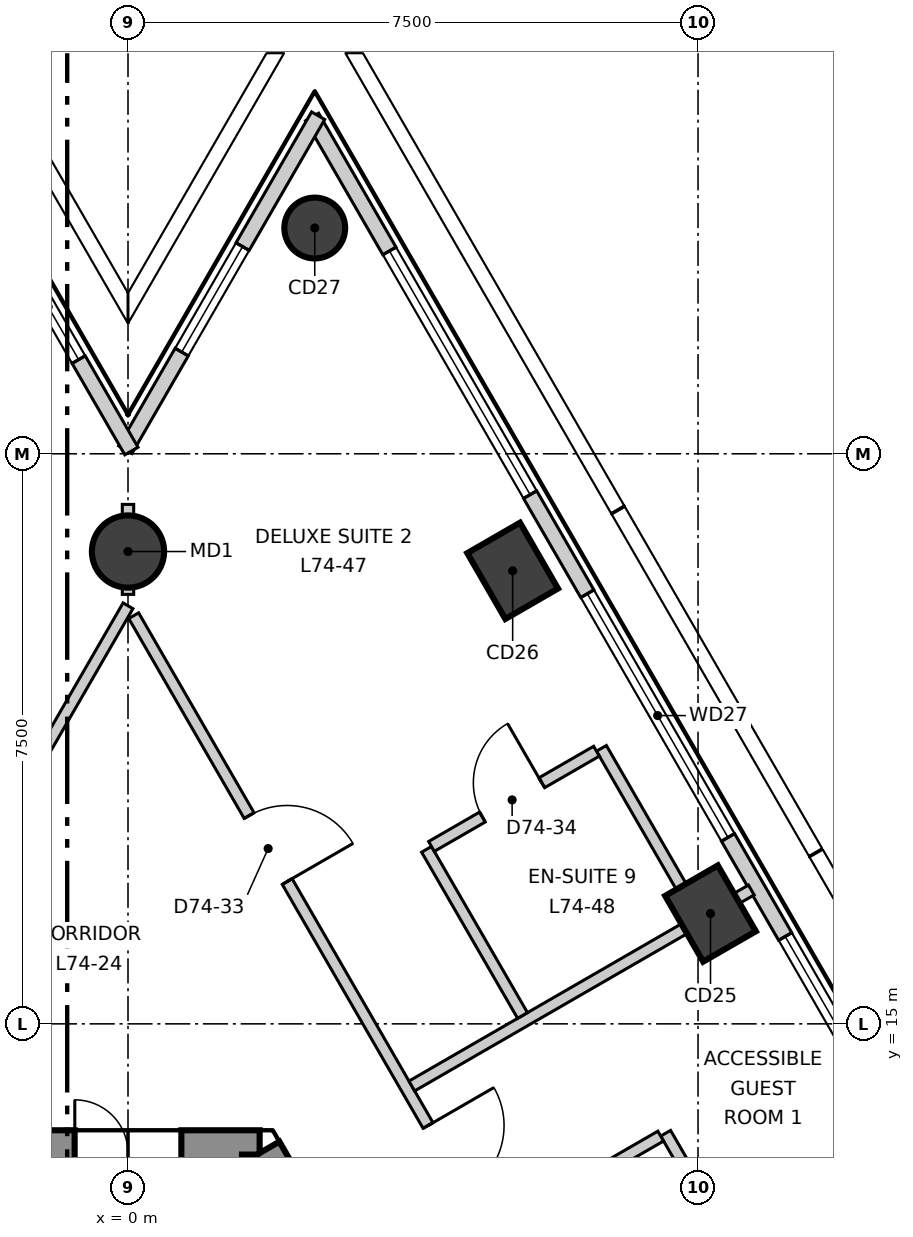
"""IFC4 building model, lengths in metres.
Left out: names, types, materials, properties, quantities, classifications, styles, units other than length and angle.
Written with IfcOpenShell. Run it as: python <this file> out.ifc"""

import sys

from ifc_helpers import new_model, si_unit, direction, frame, frame_2d, origin, origin_2d, place, context, subcontext, project, spatial, polyline, rectangle, circle, outline, extrude, element, fill, save


model = new_model("IFC4")
c1 = context("Model", 3, precision=1e-05, world=origin(), true_north=direction((0.0, 1.0)))
c2 = subcontext(c1, "Body", "Model", "MODEL_VIEW")
j1 = project(units=[si_unit("LENGTHUNIT", "METRE"), si_unit("PLANEANGLEUNIT", "RADIAN")], contexts=[c1])
p1 = place(None, origin())
s1 = spatial("IfcSite", under=j1, at=p1, CompositionType="ELEMENT")
p2 = place(p1, origin())
s2 = spatial("IfcBuilding", under=s1, at=p2, CompositionType="ELEMENT")
p3 = place(p2, frame((0.0, 0.0, 311.5)))
s3 = spatial("IfcBuildingStorey", under=s2, at=p3, CompositionType="ELEMENT", Elevation=311.5)
p4 = place(p3, frame((1.732, 13.3, -0.3), z_axis=(0.0, 0.0, 1.0), x_axis=(-1.0, 0.0, 0.0)))
e1 = element("IfcWall", 1, at=p4, inside=s3, PredefinedType="SHEAR", context=c2, shape_type="SweptSolid", body=[
    extrude(outline(polyline([(-0.173, -0.3), (1.732, -0.3), (3.637, -0.3), (3.291, 0.3), (1.732, 0.3), (0.173, 0.3), (-0.173, -0.3)])), origin(), (0.0, 0.0, 1.0), 3.6),
])
p5 = place(p4, frame((1.032, 0.0, 0.3)))
e2 = element("IfcOpeningElement", 2, at=p5, cuts=e1, PredefinedType="OPENING", context=c2, shape_type="SweptSolid", body=[
    extrude(rectangle(XDim=1.4, YDim=2.1, at=frame_2d((0.7, 1.05))), frame((0.0, 0.31, 0.0), z_axis=(0.0, -1.0, 0.0), x_axis=(1.0, 0.0, 0.0)), (0.0, 0.0, 1.0), 0.62),
])
p6 = place(p3, frame((12.384, -5.15, -0.3), z_axis=(0.0, 0.0, 1.0), x_axis=(-0.500000539815, 0.866025092122, 0.0)))
e3 = element("IfcWall", 3, at=p6, inside=s3, PredefinedType="SHEAR", context=c2, shape_type="SweptSolid", body=[
    extrude(outline(polyline([(-0.173, -0.301), (1.795, -0.301), (3.763, -0.301), (5.731, -0.301), (7.7, -0.301), (9.668, -0.301), (11.636, -0.301), (13.604, -0.3), (15.573, -0.3), (17.541, -0.3), (19.509, -0.3), (21.477, -0.3), (21.131, 0.3), (19.226, 0.3), (17.321, 0.3), (15.415, 0.3), (13.51, 0.3), (11.605, 0.3), (9.699, 0.3), (7.794, 0.3), (5.889, 0.3), (3.984, 0.3), (2.078, 0.3), (0.173, 0.3), (-0.173, -0.301)])), origin(), (0.0, 0.0, 1.0), 3.6),
])
p7 = place(p6, frame((16.378, 0.0, 0.3)))
e4 = element("IfcOpeningElement", 4, at=p7, cuts=e3, PredefinedType="OPENING", context=c2, shape_type="SweptSolid", body=[
    extrude(rectangle(XDim=0.9, YDim=2.1, at=frame_2d((0.45, 1.05))), frame((0.0, 0.31, 0.0), z_axis=(0.0, -1.0, 0.0), x_axis=(1.0, 0.0, 0.0)), (0.0, 0.0, 1.0), 0.621),
])
p8 = place(p6, frame((4.026, 0.0, 0.3)))
e5 = element("IfcOpeningElement", 5, at=p8, cuts=e3, PredefinedType="OPENING", context=c2, shape_type="SweptSolid", body=[
    extrude(rectangle(XDim=0.9, YDim=2.1, at=frame_2d((0.45, 1.05))), frame((0.0, 0.31, 0.0), z_axis=(0.0, -1.0, 0.0), x_axis=(1.0, 0.0, 0.0)), (0.0, 0.0, 1.0), 0.621),
])
for number, where, z_axis, x_axis in (
    (6, (7.664, 16.451, -0.3), (0.0, 0.0, 1.0), (-0.5, 0.866, 0.0)),
    (7, (5.061, 20.96, -0.3), (0.0, 0.0, 1.0), (-0.5, 0.866, 0.0)),
):
    element("IfcColumn", number, at=place(p3, frame(where, z_axis=z_axis, x_axis=x_axis)), inside=s3, PredefinedType="COLUMN", context=c2, shape_type="SweptSolid", body=[
        extrude(rectangle(XDim=1.0, YDim=0.8, at=origin_2d()), origin(), (0.0, 0.0, 1.0), 3.6),
    ])
p9 = place(p3, frame((2.457, 25.47, -0.3), z_axis=(0.0, 0.0, 1.0), x_axis=(-0.5, 0.866025403784, 0.0)))
e8 = element("IfcColumn", 8, at=p9, inside=s3, PredefinedType="COLUMN", context=c2, shape_type="SweptSolid", body=[
    extrude(circle(Radius=0.4, at=origin_2d()), origin(), (0.0, 0.0, 1.0), 3.6),
])
p10 = place(p3, frame((0.0, 21.214, -0.3), z_axis=(0.0, 0.0, 1.0), x_axis=(1.0, 0.0, 0.0)))
e9 = element("IfcColumn", 9, at=p10, inside=s3, PredefinedType="COLUMN", context=c2, shape_type="SweptSolid", body=[
    extrude(circle(Radius=0.475, at=origin_2d()), origin(), (0.0, 0.0, 1.0), 3.6),
])
p11 = place(p3, frame((24.544, -11.385, 0.0), z_axis=(0.0, 0.0, 1.0), x_axis=(-0.500002044679, 0.866024223285, 0.0)))
e10 = element("IfcWall", 10, at=p11, inside=s3, PredefinedType="ELEMENTEDWALL", context=c2, shape_type="SweptSolid", body=[
    extrude(rectangle(XDim=44.243, YDim=0.2, at=frame_2d((22.122, 0.0))), origin(), (0.0, 0.0, 1.0), 3.3),
])
p12 = place(p11, frame((2.056, 0.0, 0.9)))
e11 = element("IfcOpeningElement", 11, at=p12, cuts=e10, PredefinedType="OPENING", context=c2, shape_type="SweptSolid", body=[
    extrude(rectangle(XDim=3.7, YDim=2.2, at=frame_2d((1.85, 1.1))), frame((0.0, 0.11, 0.0), z_axis=(0.0, -1.0, 0.0), x_axis=(1.0, 0.0, 0.0)), (0.0, 0.0, 1.0), 0.22),
])
p13 = place(p11, frame((7.264, 0.0, 0.9)))
e12 = element("IfcOpeningElement", 12, at=p13, cuts=e10, PredefinedType="OPENING", context=c2, shape_type="SweptSolid", body=[
    extrude(rectangle(XDim=3.7, YDim=2.2, at=frame_2d((1.85, 1.1))), frame((0.0, 0.11, 0.0), z_axis=(0.0, -1.0, 0.0), x_axis=(1.0, 0.0, 0.0)), (0.0, 0.0, 1.0), 0.22),
])
p14 = place(p11, frame((12.471, 0.0, 0.9)))
e13 = element("IfcOpeningElement", 13, at=p14, cuts=e10, PredefinedType="OPENING", context=c2, shape_type="SweptSolid", body=[
    extrude(rectangle(XDim=3.7, YDim=2.2, at=frame_2d((1.85, 1.1))), frame((0.0, 0.11, 0.0), z_axis=(0.0, -1.0, 0.0), x_axis=(1.0, 0.0, 0.0)), (0.0, 0.0, 1.0), 0.22),
])
p15 = place(p11, frame((17.678, 0.0, 0.9)))
e14 = element("IfcOpeningElement", 14, at=p15, cuts=e10, PredefinedType="OPENING", context=c2, shape_type="SweptSolid", body=[
    extrude(rectangle(XDim=3.7, YDim=2.2, at=frame_2d((1.85, 1.1))), frame((0.0, 0.11, 0.0), z_axis=(0.0, -1.0, 0.0), x_axis=(1.0, 0.0, 0.0)), (0.0, 0.0, 1.0), 0.22),
])
p16 = place(p11, frame((22.885, 0.0, 0.9)))
e15 = element("IfcOpeningElement", 15, at=p16, cuts=e10, PredefinedType="OPENING", context=c2, shape_type="SweptSolid", body=[
    extrude(rectangle(XDim=3.7, YDim=2.2, at=frame_2d((1.85, 1.1))), frame((0.0, 0.11, 0.0), z_axis=(0.0, -1.0, 0.0), x_axis=(1.0, 0.0, 0.0)), (0.0, 0.0, 1.0), 0.22),
])
p17 = place(p11, frame((28.093, 0.0, 0.9)))
e16 = element("IfcOpeningElement", 16, at=p17, cuts=e10, PredefinedType="OPENING", context=c2, shape_type="SweptSolid", body=[
    extrude(rectangle(XDim=3.7, YDim=2.2, at=frame_2d((1.85, 1.1))), frame((0.0, 0.11, 0.0), z_axis=(0.0, -1.0, 0.0), x_axis=(1.0, 0.0, 0.0)), (0.0, 0.0, 1.0), 0.22),
])
p18 = place(p11, frame((33.3, 0.0, 0.9)))
e17 = element("IfcOpeningElement", 17, at=p18, cuts=e10, PredefinedType="OPENING", context=c2, shape_type="SweptSolid", body=[
    extrude(rectangle(XDim=3.7, YDim=2.2, at=frame_2d((1.85, 1.1))), frame((0.0, 0.11, 0.0), z_axis=(0.0, -1.0, 0.0), x_axis=(1.0, 0.0, 0.0)), (0.0, 0.0, 1.0), 0.22),
])
p19 = place(p11, frame((38.507, 0.0, 0.9)))
e18 = element("IfcOpeningElement", 18, at=p19, cuts=e10, PredefinedType="OPENING", context=c2, shape_type="SweptSolid", body=[
    extrude(rectangle(XDim=3.7, YDim=2.2, at=frame_2d((1.85, 1.1))), frame((0.0, 0.11, 0.0), z_axis=(0.0, -1.0, 0.0), x_axis=(1.0, 0.0, 0.0)), (0.0, 0.0, 1.0), 0.22),
])
p20 = place(p3, frame((2.502, 26.948, 0.0), z_axis=(0.0, 0.0, 1.0), x_axis=(-0.499911250765, -0.866076637116, 0.0)))
e19 = element("IfcWall", 19, at=p20, inside=s3, PredefinedType="ELEMENTEDWALL", context=c2, shape_type="SweptSolid", body=[
    extrude(rectangle(XDim=5.075, YDim=0.2, at=frame_2d((2.537, 0.0))), origin(), (0.0, 0.0, 1.0), 3.3),
])
p21 = place(p20, frame((1.99, 0.0, 0.9)))
e20 = element("IfcOpeningElement", 20, at=p21, cuts=e19, PredefinedType="OPENING", context=c2, shape_type="SweptSolid", body=[
    extrude(rectangle(XDim=1.6, YDim=2.2, at=frame_2d((0.8, 1.1))), frame((0.0, 0.11, 0.0), z_axis=(0.0, -1.0, 0.0), x_axis=(1.0, 0.0, 0.0)), (0.0, 0.0, 1.0), 0.22),
])
p22 = place(p3, frame((0.045, 22.536, 0.0), z_axis=(0.0, 0.0, 1.0), x_axis=(-0.499911250765, 0.866076637116, 0.0)))
e21 = element("IfcWall", 21, at=p22, inside=s3, PredefinedType="ELEMENTEDWALL", context=c2, shape_type="SweptSolid", body=[
    extrude(rectangle(XDim=5.075, YDim=0.2, at=frame_2d((2.537, 0.0))), origin(), (0.0, 0.0, 1.0), 3.3),
])
p23 = place(p22, frame((1.39, 0.0, 0.9)))
e22 = element("IfcOpeningElement", 22, at=p23, cuts=e21, PredefinedType="OPENING", context=c2, shape_type="SweptSolid", body=[
    extrude(rectangle(XDim=1.6, YDim=2.2, at=frame_2d((0.8, 1.1))), frame((0.0, 0.11, 0.0), z_axis=(0.0, -1.0, 0.0), x_axis=(1.0, 0.0, 0.0)), (0.0, 0.0, 1.0), 0.22),
])
p24 = place(p3, frame((-17.678, -10.12, 0.0), z_axis=(0.0, 0.0, 1.0), x_axis=(0.49998824015, 0.86603219323, 0.0)))
e23 = element("IfcWall", 23, at=p24, inside=s3, PredefinedType="PARTITIONING", context=c2, shape_type="SweptSolid", body=[
    extrude(rectangle(XDim=35.357, YDim=0.15, at=frame_2d((17.678, 0.0))), origin(), (0.0, 0.0, 1.0), 3.3),
])
p25 = place(p24, frame((28.607, 0.0, 0.0)))
e24 = element("IfcOpeningElement", 24, at=p25, cuts=e23, PredefinedType="OPENING", context=c2, shape_type="SweptSolid", body=[
    extrude(rectangle(XDim=1.0, YDim=2.1, at=frame_2d((0.5, 1.05))), frame((0.0, 0.085, 0.0), z_axis=(0.0, -1.0, 0.0), x_axis=(1.0, 0.0, 0.0)), (0.0, 0.0, 1.0), 0.17),
])
p26 = place(p24, frame((13.86, 0.0, 0.0)))
e25 = element("IfcOpeningElement", 25, at=p26, cuts=e23, PredefinedType="OPENING", context=c2, shape_type="SweptSolid", body=[
    extrude(rectangle(XDim=1.0, YDim=2.1, at=frame_2d((0.5, 1.05))), frame((0.0, 0.085, 0.0), z_axis=(0.0, -1.0, 0.0), x_axis=(1.0, 0.0, 0.0)), (0.0, 0.0, 1.0), 0.17),
])
p27 = place(p24, frame((18.96, 0.0, 0.0)))
e26 = element("IfcOpeningElement", 26, at=p27, cuts=e23, PredefinedType="OPENING", context=c2, shape_type="SweptSolid", body=[
    extrude(rectangle(XDim=0.9, YDim=2.1, at=frame_2d((0.45, 1.05))), frame((0.0, 0.085, 0.0), z_axis=(0.0, -1.0, 0.0), x_axis=(1.0, 0.0, 0.0)), (0.0, 0.0, 1.0), 0.17),
])
p28 = place(p24, frame((16.86, 0.0, 0.0)))
e27 = element("IfcOpeningElement", 27, at=p28, cuts=e23, PredefinedType="OPENING", context=c2, shape_type="SweptSolid", body=[
    extrude(rectangle(XDim=0.9, YDim=2.1, at=frame_2d((0.45, 1.05))), frame((0.0, 0.085, 0.0), z_axis=(0.0, -1.0, 0.0), x_axis=(1.0, 0.0, 0.0)), (0.0, 0.0, 1.0), 0.17),
])
p29 = place(p24, frame((8.146, 0.0, 0.0)))
e28 = element("IfcOpeningElement", 28, at=p29, cuts=e23, PredefinedType="OPENING", context=c2, shape_type="SweptSolid", body=[
    extrude(rectangle(XDim=1.0, YDim=2.1, at=frame_2d((0.5, 1.05))), frame((0.0, 0.085, 0.0), z_axis=(0.0, -1.0, 0.0), x_axis=(1.0, 0.0, 0.0)), (0.0, 0.0, 1.0), 0.17),
])
p30 = place(p24, frame((3.038, 0.0, 0.0)))
e29 = element("IfcOpeningElement", 29, at=p30, cuts=e23, PredefinedType="OPENING", context=c2, shape_type="SweptSolid", body=[
    extrude(rectangle(XDim=1.0, YDim=2.1, at=frame_2d((0.5, 1.05))), frame((0.0, 0.085, 0.0), z_axis=(0.0, -1.0, 0.0), x_axis=(1.0, 0.0, 0.0)), (0.0, 0.0, 1.0), 0.17),
])
p31 = place(p3, frame((0.0, 20.65, 0.0), z_axis=(0.0, 0.0, 1.0), x_axis=(0.0, 1.0, 0.0)))
e30 = element("IfcWall", 30, at=p31, inside=s3, PredefinedType="PARTITIONING", context=c2, shape_type="SweptSolid", body=[
    extrude(rectangle(XDim=1.184, YDim=0.15, at=frame_2d((0.592, 0.0))), origin(), (0.0, 0.0, 1.0), 2.8),
])
p32 = place(p3, frame((0.075, 20.37, 0.0), z_axis=(0.0, 0.0, 1.0), x_axis=(0.500006672087, -0.866021551619, 0.0)))
e31 = element("IfcWall", 31, at=p32, inside=s3, PredefinedType="PARTITIONING", context=c2, shape_type="SweptSolid", body=[
    extrude(rectangle(XDim=35.27, YDim=0.15, at=frame_2d((17.635, 0.0))), origin(), (0.0, 0.0, 1.0), 3.3),
])
p33 = place(p32, frame((31.206, 0.0, 0.0)))
e32 = element("IfcOpeningElement", 32, at=p33, cuts=e31, PredefinedType="OPENING", context=c2, shape_type="SweptSolid", body=[
    extrude(rectangle(XDim=1.0, YDim=2.1, at=frame_2d((0.5, 1.05))), frame((0.0, 0.085, 0.0), z_axis=(0.0, -1.0, 0.0), x_axis=(1.0, 0.0, 0.0)), (0.0, 0.0, 1.0), 0.17),
])
p34 = place(p32, frame((19.968, 0.0, 0.0)))
e33 = element("IfcOpeningElement", 33, at=p34, cuts=e31, PredefinedType="OPENING", context=c2, shape_type="SweptSolid", body=[
    extrude(rectangle(XDim=1.0, YDim=2.1, at=frame_2d((0.5, 1.05))), frame((0.0, 0.085, 0.0), z_axis=(0.0, -1.0, 0.0), x_axis=(1.0, 0.0, 0.0)), (0.0, 0.0, 1.0), 0.17),
])
p35 = place(p32, frame((13.353, 0.0, 0.0)))
e34 = element("IfcOpeningElement", 34, at=p35, cuts=e31, PredefinedType="OPENING", context=c2, shape_type="SweptSolid", body=[
    extrude(rectangle(XDim=1.0, YDim=2.1, at=frame_2d((0.5, 1.05))), frame((0.0, 0.085, 0.0), z_axis=(0.0, -1.0, 0.0), x_axis=(1.0, 0.0, 0.0)), (0.0, 0.0, 1.0), 0.17),
])
p36 = place(p32, frame((7.746, 0.0, 0.0)))
e35 = element("IfcOpeningElement", 35, at=p36, cuts=e31, PredefinedType="OPENING", context=c2, shape_type="SweptSolid", body=[
    extrude(rectangle(XDim=1.0, YDim=2.1, at=frame_2d((0.5, 1.05))), frame((0.0, 0.085, 0.0), z_axis=(0.0, -1.0, 0.0), x_axis=(1.0, 0.0, 0.0)), (0.0, 0.0, 1.0), 0.17),
])
p37 = place(p32, frame((3.038, 0.0, 0.0)))
e36 = element("IfcOpeningElement", 36, at=p37, cuts=e31, PredefinedType="OPENING", context=c2, shape_type="SweptSolid", body=[
    extrude(rectangle(XDim=1.0, YDim=2.1, at=frame_2d((0.5, 1.05))), frame((0.0, 0.085, 0.0), z_axis=(0.0, -1.0, 0.0), x_axis=(1.0, 0.0, 0.0)), (0.0, 0.0, 1.0), 0.17),
])
p38 = place(p3, frame((3.734, 14.182, 0.0), z_axis=(0.0, 0.0, 1.0), x_axis=(0.866020851292, 0.500007885066, 0.0)))
e37 = element("IfcWall", 37, at=p38, inside=s3, PredefinedType="PARTITIONING", context=c2, shape_type="SweptSolid", body=[
    extrude(rectangle(XDim=5.158, YDim=0.15, at=frame_2d((2.579, 0.0))), origin(), (0.0, 0.0, 1.0), 3.3),
])
p39 = place(p3, frame((7.074, 13.561, 0.0), z_axis=(0.0, 0.0, 1.0), x_axis=(0.499874209568, -0.866098016745, 0.0)))
e38 = element("IfcWall", 38, at=p39, inside=s3, PredefinedType="PARTITIONING", context=c2, shape_type="SweptSolid", body=[
    extrude(rectangle(XDim=2.925, YDim=0.15, at=frame_2d((1.462, 0.0))), origin(), (0.0, 0.0, 1.0), 3.3),
])
p40 = place(p39, frame((1.05, 0.0, 0.0)))
e39 = element("IfcOpeningElement", 39, at=p40, cuts=e38, PredefinedType="OPENING", context=c2, shape_type="SweptSolid", body=[
    extrude(rectangle(XDim=0.9, YDim=2.1, at=frame_2d((0.45, 1.05))), frame((0.0, 0.085, 0.0), z_axis=(0.0, -1.0, 0.0), x_axis=(1.0, 0.0, 0.0)), (0.0, 0.0, 1.0), 0.17),
])
p41 = place(p3, frame((4.838, 12.27, 0.0), z_axis=(0.0, 0.0, 1.0), x_axis=(0.866125586781, 0.4998264378, 0.0)))
e40 = element("IfcWall", 40, at=p41, inside=s3, PredefinedType="PARTITIONING", context=c2, shape_type="SweptSolid", body=[
    extrude(rectangle(XDim=2.507, YDim=0.15, at=frame_2d((1.253, 0.0))), origin(), (0.0, 0.0, 1.0), 3.3),
])
p42 = place(p3, frame((3.928, 17.296, 0.0), z_axis=(0.0, 0.0, 1.0), x_axis=(0.50028887667, -0.865858556509, 0.0)))
e41 = element("IfcWall", 41, at=p42, inside=s3, PredefinedType="PARTITIONING", context=c2, shape_type="SweptSolid", body=[
    extrude(rectangle(XDim=2.524, YDim=0.15, at=frame_2d((1.262, 0.0))), origin(), (0.0, 0.0, 1.0), 3.3),
])
p43 = place(p3, frame((6.229, 18.625, 0.0), z_axis=(0.0, 0.0, 1.0), x_axis=(0.499789415832, -0.866146950478, 0.0)))
e42 = element("IfcWall", 42, at=p43, inside=s3, PredefinedType="PARTITIONING", context=c2, shape_type="SweptSolid", body=[
    extrude(rectangle(XDim=2.525, YDim=0.15, at=frame_2d((1.262, 0.0))), origin(), (0.0, 0.0, 1.0), 2.6),
])
p44 = place(p3, frame((3.993, 17.334, 0.0), z_axis=(0.0, 0.0, 1.0), x_axis=(0.866125586781, 0.4998264378, 0.0)))
e43 = element("IfcWall", 43, at=p44, inside=s3, PredefinedType="PARTITIONING", context=c2, shape_type="SweptSolid", body=[
    extrude(rectangle(XDim=2.507, YDim=0.15, at=frame_2d((1.253, 0.0))), origin(), (0.0, 0.0, 1.0), 3.3),
])
p45 = place(p44, frame((0.775, 0.0, 0.0)))
e44 = element("IfcOpeningElement", 44, at=p45, cuts=e43, PredefinedType="OPENING", context=c2, shape_type="SweptSolid", body=[
    extrude(rectangle(XDim=0.9, YDim=2.1, at=frame_2d((0.45, 1.05))), frame((0.0, 0.085, 0.0), z_axis=(0.0, -1.0, 0.0), x_axis=(1.0, 0.0, 0.0)), (0.0, 0.0, 1.0), 0.17),
])
p46 = place(p3, frame((1.6, 6.615, 0.0), z_axis=(0.0, 0.0, 1.0), x_axis=(0.0, 1.0, 0.0)))
e45 = element("IfcWall", 45, at=p46, inside=s3, PredefinedType="SOLIDWALL", context=c2, shape_type="SweptSolid", body=[
    extrude(rectangle(XDim=6.665, YDim=0.2, at=frame_2d((3.333, 0.0))), origin(), (0.0, 0.0, 1.0), 3.3),
])
p47 = place(p17, origin())
e46 = element("IfcWindow", 46, at=p47, inside=s3, PartitioningType="SINGLE_PANEL", PredefinedType="WINDOW", context=c2, shape_type="SweptSolid", body=[
    extrude(rectangle(XDim=3.7, YDim=2.2, at=frame_2d((1.85, 1.1))), frame((0.0, 0.03, 0.0), z_axis=(0.0, -1.0, 0.0), x_axis=(1.0, 0.0, 0.0)), (0.0, 0.0, 1.0), 0.06),
])
fill(e16, e46)
p48 = place(p18, origin())
e47 = element("IfcWindow", 47, at=p48, inside=s3, PartitioningType="SINGLE_PANEL", PredefinedType="WINDOW", context=c2, shape_type="SweptSolid", body=[
    extrude(rectangle(XDim=3.7, YDim=2.2, at=frame_2d((1.85, 1.1))), frame((0.0, 0.03, 0.0), z_axis=(0.0, -1.0, 0.0), x_axis=(1.0, 0.0, 0.0)), (0.0, 0.0, 1.0), 0.06),
])
fill(e17, e47)
p49 = place(p19, origin())
e48 = element("IfcWindow", 48, at=p49, inside=s3, PartitioningType="SINGLE_PANEL", PredefinedType="WINDOW", context=c2, shape_type="SweptSolid", body=[
    extrude(rectangle(XDim=3.7, YDim=2.2, at=frame_2d((1.85, 1.1))), frame((0.0, 0.03, 0.0), z_axis=(0.0, -1.0, 0.0), x_axis=(1.0, 0.0, 0.0)), (0.0, 0.0, 1.0), 0.06),
])
fill(e18, e48)
p50 = place(p21, origin())
e49 = element("IfcWindow", 49, at=p50, inside=s3, PartitioningType="SINGLE_PANEL", PredefinedType="WINDOW", context=c2, shape_type="SweptSolid", body=[
    extrude(rectangle(XDim=1.6, YDim=2.2, at=frame_2d((0.8, 1.1))), frame((0.0, 0.03, 0.0), z_axis=(0.0, -1.0, 0.0), x_axis=(1.0, 0.0, 0.0)), (0.0, 0.0, 1.0), 0.06),
])
fill(e20, e49)
p51 = place(p23, origin())
e50 = element("IfcWindow", 50, at=p51, inside=s3, PartitioningType="SINGLE_PANEL", PredefinedType="WINDOW", context=c2, shape_type="SweptSolid", body=[
    extrude(rectangle(XDim=1.6, YDim=2.2, at=frame_2d((0.8, 1.1))), frame((0.0, 0.03, 0.0), z_axis=(0.0, -1.0, 0.0), x_axis=(1.0, 0.0, 0.0)), (0.0, 0.0, 1.0), 0.06),
])
fill(e22, e50)
p52 = place(p36, origin())
e51 = element("IfcDoor", 51, at=p52, inside=s3, OperationType="SINGLE_SWING_RIGHT", PredefinedType="DOOR", context=c2, shape_type="SweptSolid", body=[
    extrude(rectangle(XDim=1.0, YDim=2.1, at=frame_2d((0.5, 1.05))), frame((0.0, 0.025, 0.0), z_axis=(0.0, -1.0, 0.0), x_axis=(1.0, 0.0, 0.0)), (0.0, 0.0, 1.0), 0.05),
])
fill(e35, e51)
p53 = place(p37, origin())
e52 = element("IfcDoor", 52, at=p53, inside=s3, OperationType="SINGLE_SWING_LEFT", PredefinedType="DOOR", context=c2, shape_type="SweptSolid", body=[
    extrude(rectangle(XDim=1.0, YDim=2.1, at=frame_2d((0.5, 1.05))), frame((0.0, 0.025, 0.0), z_axis=(0.0, -1.0, 0.0), x_axis=(1.0, 0.0, 0.0)), (0.0, 0.0, 1.0), 0.05),
])
fill(e36, e52)
p54 = place(p45, origin())
e53 = element("IfcDoor", 53, at=p54, inside=s3, OperationType="SINGLE_SWING_LEFT", PredefinedType="DOOR", context=c2, shape_type="SweptSolid", body=[
    extrude(rectangle(XDim=0.9, YDim=2.1, at=frame_2d((0.45, 1.05))), frame((0.0, 0.025, 0.0), z_axis=(0.0, -1.0, 0.0), x_axis=(1.0, 0.0, 0.0)), (0.0, 0.0, 1.0), 0.05),
])
fill(e44, e53)
p55 = place(p5, origin())
e54 = element("IfcDoor", 54, at=p55, inside=s3, OperationType="DOUBLE_DOOR_SINGLE_SWING", PredefinedType="DOOR", context=c2, shape_type="SweptSolid", body=[
    extrude(rectangle(XDim=1.4, YDim=2.1, at=frame_2d((0.7, 1.05))), frame((0.0, 0.025, 0.0), z_axis=(0.0, -1.0, 0.0), x_axis=(1.0, 0.0, 0.0)), (0.0, 0.0, 1.0), 0.05),
])
fill(e2, e54)
save(model, sys.argv[1])
